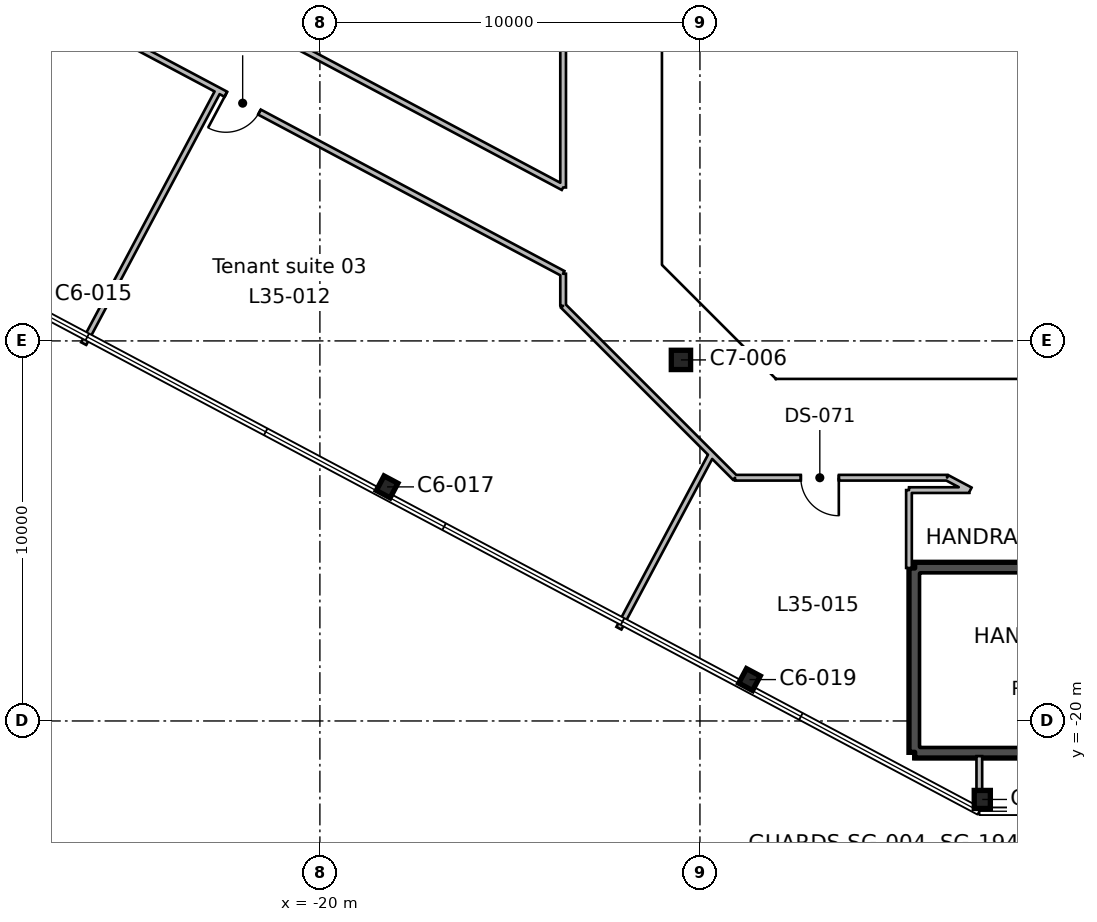
"""IFC4 building model, lengths in metres.
Left out: names, types, materials, properties, quantities, classifications, styles, units other than length and angle.
Written with IfcOpenShell. Run it as: python <this file> out.ifc"""

import sys

from ifc_helpers import new_model, si_unit, direction, frame, frame_2d, origin, origin_2d, place, context, subcontext, project, spatial, rectangle, hollow_rectangle, i_section, extrude, element, fill, save


model = new_model("IFC4")
c1 = context("Model", 3, precision=1e-05, world=origin(), true_north=direction((0.0, 1.0)))
c2 = subcontext(c1, "Body", "Model", "MODEL_VIEW")
j1 = project(units=[si_unit("LENGTHUNIT", "METRE"), si_unit("PLANEANGLEUNIT", "RADIAN")], contexts=[c1])
p1 = place(None, origin())
s1 = spatial("IfcSite", under=j1, at=p1, CompositionType="ELEMENT")
p2 = place(p1, origin())
s2 = spatial("IfcBuilding", under=s1, at=p2, CompositionType="ELEMENT")
p3 = place(p2, frame((0.0, 0.0, 166.2)))
s3 = spatial("IfcBuildingStorey", under=s2, at=p3, CompositionType="ELEMENT", Elevation=166.2)
p4 = place(p3, frame((-2.571, -22.065, 0.0), z_axis=(0.0, 0.0, 1.0), x_axis=(1.0, 0.0, 0.0)))
e1 = element("IfcColumn", 1, at=p4, inside=s3, PredefinedType="COLUMN", context=c2, shape_type="SweptSolid", body=[
    extrude(i_section(OverallWidth=0.424, OverallDepth=0.475, WebThickness=0.048, FlangeThickness=0.077, FilletRadius=0.015, at=origin_2d()), origin(), (0.0, 0.0, 1.0), 4.0),
])
for number, where, z_axis, x_axis in (
    (2, (-8.696, -18.911, 0.0), (0.0, 0.0, 1.0), (0.883, -0.469, 0.0)),
    (3, (-18.232, -13.841, 0.0), (0.0, 0.0, 1.0), (0.883, -0.469, 0.0)),
):
    element("IfcColumn", number, at=place(p3, frame(where, z_axis=z_axis, x_axis=x_axis)), inside=s3, PredefinedType="COLUMN", context=c2, shape_type="SweptSolid", body=[
        extrude(i_section(OverallWidth=0.412, OverallDepth=0.434, WebThickness=0.036, FlangeThickness=0.057, FilletRadius=0.015, at=origin_2d()), origin(), (0.0, 0.0, 1.0), 4.0),
    ])
p5 = place(p3, frame((-10.5, -10.5, 0.0), z_axis=(0.0, 0.0, 1.0), x_axis=(1.0, 0.0, 0.0)))
e4 = element("IfcColumn", 4, at=p5, inside=s3, PredefinedType="COLUMN", context=c2, shape_type="SweptSolid", body=[
    extrude(hollow_rectangle(XDim=0.508, YDim=0.508, WallThickness=0.012, InnerFilletRadius=0.006, OuterFilletRadius=0.018, at=origin_2d()), origin(), (0.0, 0.0, 1.0), 4.0),
])
p6 = place(p3, frame((3.95, -20.825, 0.0), z_axis=(0.0, 0.0, 1.0), x_axis=(-1.0, 0.0, 0.0)))
e5 = element("IfcWall", 5, at=p6, inside=s3, PredefinedType="SHEAR", context=c2, shape_type="SweptSolid", body=[
    extrude(rectangle(XDim=8.3, YDim=0.3, at=frame_2d((4.15, 0.0))), origin(), (0.0, 0.0, 1.0), 4.0),
])
p7 = place(p3, frame((-4.35, -20.825, 0.0), z_axis=(0.0, 0.0, 1.0), x_axis=(0.0, 1.0, 0.0)))
e6 = element("IfcWall", 6, at=p7, inside=s3, PredefinedType="SHEAR", context=c2, shape_type="SweptSolid", body=[
    extrude(rectangle(XDim=4.85, YDim=0.3, at=frame_2d((2.425, 0.0))), origin(), (0.0, 0.0, 1.0), 4.0),
])
p8 = place(p3, frame((-4.35, -15.975, 0.0), z_axis=(0.0, 0.0, 1.0), x_axis=(1.0, 0.0, 0.0)))
e7 = element("IfcWall", 7, at=p8, inside=s3, PredefinedType="SHEAR", context=c2, shape_type="SweptSolid", body=[
    extrude(rectangle(XDim=8.3, YDim=0.3, at=frame_2d((4.15, 0.0))), origin(), (0.0, 0.0, 1.0), 4.0),
])
p9 = place(p8, frame((6.05, 0.0, 0.0)))
e8 = element("IfcOpeningElement", 8, at=p9, cuts=e7, PredefinedType="OPENING", context=c2, shape_type="SweptSolid", body=[
    extrude(rectangle(XDim=1.9, YDim=2.1, at=frame_2d((0.95, 1.05))), frame((0.0, 0.16, 0.0), z_axis=(0.0, -1.0, 0.0), x_axis=(1.0, 0.0, 0.0)), (0.0, 0.0, 1.0), 0.32),
])
p10 = place(p3, frame((-22.67, -3.406, 0.0), z_axis=(0.0, 0.0, 1.0), x_axis=(-0.469451537303, -0.882958240306, 0.0)))
e9 = element("IfcWall", 9, at=p10, inside=s3, PredefinedType="PARTITIONING", context=c2, shape_type="SweptSolid", body=[
    extrude(rectangle(XDim=7.55, YDim=0.15, at=frame_2d((3.775, 0.0))), origin(), (0.0, 0.0, 1.0), 3.64),
])
p11 = place(p3, frame((-13.6, -8.228, 0.0), z_axis=(0.0, 0.0, 1.0), x_axis=(-0.882954510497, 0.469458552369, 0.0)))
e10 = element("IfcWall", 10, at=p11, inside=s3, PredefinedType="PARTITIONING", context=c2, shape_type="SweptSolid", body=[
    extrude(rectangle(XDim=34.953, YDim=0.15, at=frame_2d((17.477, 0.0))), origin(), (0.0, 0.0, 1.0), 3.64),
])
p12 = place(p11, frame((16.55, 0.0, 0.0)))
e11 = element("IfcOpeningElement", 11, at=p12, cuts=e10, PredefinedType="OPENING", context=c2, shape_type="SweptSolid", body=[
    extrude(rectangle(XDim=1.8, YDim=2.1, at=frame_2d((0.9, 1.05))), frame((0.0, 0.085, 0.0), z_axis=(0.0, -1.0, 0.0), x_axis=(1.0, 0.0, 0.0)), (0.0, 0.0, 1.0), 0.17),
])
p13 = place(p11, frame((9.05, 0.0, 0.0)))
e12 = element("IfcOpeningElement", 12, at=p13, cuts=e10, PredefinedType="OPENING", context=c2, shape_type="SweptSolid", body=[
    extrude(rectangle(XDim=1.0, YDim=2.1, at=frame_2d((0.5, 1.05))), frame((0.0, 0.085, 0.0), z_axis=(0.0, -1.0, 0.0), x_axis=(1.0, 0.0, 0.0)), (0.0, 0.0, 1.0), 0.17),
])
p14 = place(p3, frame((-10.454, -12.223, 0.0), z_axis=(0.0, 0.0, 1.0), x_axis=(-0.707106781187, 0.707106781187, 0.0)))
e13 = element("IfcWall", 13, at=p14, inside=s3, PredefinedType="PARTITIONING", context=c2, shape_type="SweptSolid", body=[
    extrude(rectangle(XDim=4.449, YDim=0.15, at=frame_2d((2.225, 0.0))), origin(), (0.0, 0.0, 1.0), 3.64),
])
p15 = place(p3, frame((-13.6, -9.077, 0.0), z_axis=(0.0, 0.0, 1.0), x_axis=(0.0, 1.0, 0.0)))
e14 = element("IfcWall", 14, at=p15, inside=s3, PredefinedType="PARTITIONING", context=c2, shape_type="SweptSolid", body=[
    extrude(rectangle(XDim=0.844, YDim=0.15, at=frame_2d((0.422, 0.0))), origin(), (0.0, 0.0, 1.0), 3.64),
])
p16 = place(p3, frame((-9.696, -12.981, 0.0), z_axis=(0.0, 0.0, 1.0), x_axis=(-0.469664493403, -0.882844982789, 0.0)))
e15 = element("IfcWall", 15, at=p16, inside=s3, PredefinedType="PARTITIONING", context=c2, shape_type="SweptSolid", body=[
    extrude(rectangle(XDim=5.187, YDim=0.15, at=frame_2d((2.593, 0.0))), origin(), (0.0, 0.0, 1.0), 3.64),
])
p17 = place(p3, frame((-9.693, -12.984, 0.0), z_axis=(0.0, 0.0, 1.0), x_axis=(-0.707106781187, 0.707106781187, 0.0)))
e16 = element("IfcWall", 16, at=p17, inside=s3, PredefinedType="PARTITIONING", context=c2, shape_type="SweptSolid", body=[
    extrude(rectangle(XDim=1.076, YDim=0.15, at=frame_2d((0.538, 0.0))), origin(), (0.0, 0.0, 1.0), 3.64),
])
p18 = place(p3, frame((-4.596, -13.6, 0.0), z_axis=(0.0, 0.0, 1.0), x_axis=(-1.0, 0.0, 0.0)))
e17 = element("IfcWall", 17, at=p18, inside=s3, PredefinedType="PARTITIONING", context=c2, shape_type="SweptSolid", body=[
    extrude(rectangle(XDim=4.481, YDim=0.15, at=frame_2d((2.24, 0.0))), origin(), (0.0, 0.0, 1.0), 3.64),
])
p19 = place(p18, frame((1.75, 0.0, 0.0)))
e18 = element("IfcOpeningElement", 18, at=p19, cuts=e17, PredefinedType="OPENING", context=c2, shape_type="SweptSolid", body=[
    extrude(rectangle(XDim=1.0, YDim=2.1, at=frame_2d((0.5, 1.05))), frame((0.0, 0.085, 0.0), z_axis=(0.0, -1.0, 0.0), x_axis=(1.0, 0.0, 0.0)), (0.0, 0.0, 1.0), 0.17),
])
p20 = place(p3, frame((-9.077, -13.6, 0.0), z_axis=(0.0, 0.0, 1.0), x_axis=(-0.707106781187, 0.707106781187, 0.0)))
e19 = element("IfcWall", 19, at=p20, inside=s3, PredefinedType="PARTITIONING", context=c2, shape_type="SweptSolid", body=[
    extrude(rectangle(XDim=0.871, YDim=0.15, at=frame_2d((0.436, 0.0))), origin(), (0.0, 0.0, 1.0), 3.64),
])
p21 = place(p3, frame((-2.886, -13.925, 0.0), z_axis=(0.0, 0.0, 1.0), x_axis=(-0.882928394432, 0.469507667994, 0.0)))
e20 = element("IfcWall", 20, at=p21, inside=s3, PredefinedType="PARTITIONING", context=c2, shape_type="SweptSolid", body=[
    extrude(rectangle(XDim=0.692, YDim=0.15, at=frame_2d((0.346, 0.0))), origin(), (0.0, 0.0, 1.0), 3.64),
])
p22 = place(p3, frame((-3.497, -13.6, 0.0), z_axis=(0.0, 0.0, 1.0), x_axis=(-1.0, 0.0, 0.0)))
e21 = element("IfcWall", 21, at=p22, inside=s3, PredefinedType="PARTITIONING", context=c2, shape_type="SweptSolid", body=[
    extrude(rectangle(XDim=1.099, YDim=0.15, at=frame_2d((0.549, 0.0))), origin(), (0.0, 0.0, 1.0), 3.64),
])
p23 = place(p3, frame((-4.5, -15.975, 0.0), z_axis=(0.0, 0.0, 1.0), x_axis=(0.0, 1.0, 0.0)))
e22 = element("IfcWall", 22, at=p23, inside=s3, PredefinedType="PARTITIONING", context=c2, shape_type="SweptSolid", body=[
    extrude(rectangle(XDim=2.05, YDim=0.15, at=frame_2d((1.025, 0.0))), origin(), (0.0, 0.0, 1.0), 3.64),
])
p24 = place(p3, frame((-2.909, -13.925, 0.0), z_axis=(0.0, 0.0, 1.0), x_axis=(-0.999999811638, -0.000613779231, 0.0)))
e23 = element("IfcWall", 23, at=p24, inside=s3, PredefinedType="PARTITIONING", context=c2, shape_type="SweptSolid", body=[
    extrude(rectangle(XDim=1.591, YDim=0.15, at=frame_2d((0.795, 0.0))), origin(), (0.0, 0.0, 1.0), 3.64),
])
p25 = place(p3, frame((-2.649, -20.925, 0.0), z_axis=(0.0, 0.0, 1.0), x_axis=(0.0, -1.0, 0.0)))
e24 = element("IfcWall", 24, at=p25, inside=s3, PredefinedType="PARTITIONING", context=c2, shape_type="SweptSolid", body=[
    extrude(rectangle(XDim=0.903, YDim=0.15, at=frame_2d((0.451, 0.0))), origin(), (0.0, 0.0, 1.0), 3.64),
])
p26 = place(p3, frame((-13.6, 9.077, 0.0), z_axis=(0.0, 0.0, 1.0), x_axis=(0.0, -1.0, 0.0)))
e25 = element("IfcWall", 25, at=p26, inside=s3, PredefinedType="PARTITIONING", context=c2, shape_type="SweptSolid", body=[
    extrude(rectangle(XDim=15.04, YDim=0.15, at=frame_2d((7.52, 0.0))), origin(), (0.0, 0.0, 1.0), 3.64),
])
p27 = place(p3, frame((-13.6, -5.963, 0.0), z_axis=(0.0, 0.0, 1.0), x_axis=(-0.882954936964, 0.469457750273, 0.0)))
e26 = element("IfcWall", 26, at=p27, inside=s3, PredefinedType="PARTITIONING", context=c2, shape_type="SweptSolid", body=[
    extrude(rectangle(XDim=8.791, YDim=0.15, at=frame_2d((4.396, 0.0))), origin(), (0.0, 0.0, 1.0), 3.64),
])
p28 = place(p13, origin())
e27 = element("IfcDoor", 27, at=p28, inside=s3, OperationType="SINGLE_SWING_RIGHT", PredefinedType="DOOR", context=c2, shape_type="SweptSolid", body=[
    extrude(rectangle(XDim=1.0, YDim=2.1, at=frame_2d((0.5, 1.05))), frame((0.0, 0.025, 0.0), z_axis=(0.0, -1.0, 0.0), x_axis=(1.0, 0.0, 0.0)), (0.0, 0.0, 1.0), 0.05),
])
fill(e12, e27)
p29 = place(p19, origin())
e28 = element("IfcDoor", 28, at=p29, inside=s3, OperationType="SINGLE_SWING_LEFT", PredefinedType="DOOR", context=c2, shape_type="SweptSolid", body=[
    extrude(rectangle(XDim=1.0, YDim=2.1, at=frame_2d((0.5, 1.05))), frame((0.0, 0.025, 0.0), z_axis=(0.0, -1.0, 0.0), x_axis=(1.0, 0.0, 0.0)), (0.0, 0.0, 1.0), 0.05),
])
fill(e18, e28)
save(model, sys.argv[1])
